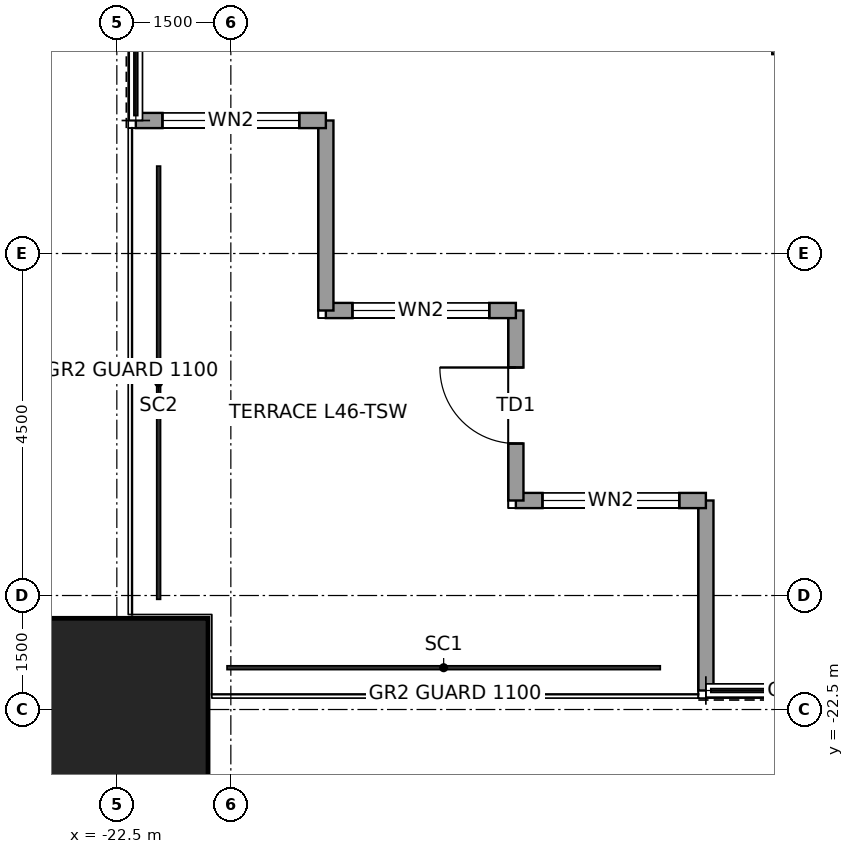
"""IFC4 building model, lengths in metres.
Left out: names, types, materials, properties, quantities, classifications, styles, units other than length and angle.
Written with IfcOpenShell. Run it as: python <this file> out.ifc"""

import sys

from ifc_helpers import new_model, si_unit, direction, frame, frame_2d, origin, origin_2d, place, context, subcontext, project, spatial, rectangle, hollow_rectangle, extrude, element, fill, save


model = new_model("IFC4")
c1 = context("Model", 3, precision=1e-05, world=origin(), true_north=direction((0.0, 1.0)))
c2 = subcontext(c1, "Body", "Model", "MODEL_VIEW")
j1 = project(units=[si_unit("LENGTHUNIT", "METRE"), si_unit("PLANEANGLEUNIT", "RADIAN")], contexts=[c1])
p1 = place(None, origin())
s1 = spatial("IfcSite", under=j1, at=p1, CompositionType="ELEMENT")
p2 = place(p1, origin())
s2 = spatial("IfcBuilding", under=s1, at=p2, CompositionType="ELEMENT")
p3 = place(p2, frame((0.0, 0.0, 217.9)))
s3 = spatial("IfcBuildingStorey", under=s2, at=p3, CompositionType="ELEMENT", Elevation=217.9)
p4 = place(p3, frame((-22.5, -22.5, 0.0), z_axis=(0.0, 0.0, 1.0), x_axis=(1.0, 0.0, 0.0)))
e1 = element("IfcColumn", 1, at=p4, inside=s3, PredefinedType="COLUMN", context=c2, shape_type="SweptSolid", body=[
    extrude(hollow_rectangle(XDim=2.4, YDim=2.4, WallThickness=0.12, at=origin_2d()), origin(), (0.0, 0.0, 1.0), 4.0),
])
p5 = place(p3, frame((-14.75, -22.25, 0.0), z_axis=(0.0, 0.0, 1.0), x_axis=(0.0, 1.0, 0.0)))
e2 = element("IfcWall", 2, at=p5, inside=s3, PredefinedType="SOLIDWALL", context=c2, shape_type="SweptSolid", body=[
    extrude(rectangle(XDim=2.5, YDim=0.2, at=frame_2d((1.25, 0.0))), origin(), (0.0, 0.0, 1.0), 3.85),
])
p6 = place(p3, frame((-14.75, -19.75, 0.0), z_axis=(0.0, 0.0, 1.0), x_axis=(-1.0, 0.0, 0.0)))
e3 = element("IfcWall", 3, at=p6, inside=s3, PredefinedType="SOLIDWALL", context=c2, shape_type="SweptSolid", body=[
    extrude(rectangle(XDim=2.5, YDim=0.2, at=frame_2d((1.25, 0.0))), origin(), (0.0, 0.0, 1.0), 3.85),
])
p7 = place(p6, frame((0.35, 0.0, 0.3)))
e4 = element("IfcOpeningElement", 4, at=p7, cuts=e3, PredefinedType="OPENING", context=c2, shape_type="SweptSolid", body=[
    extrude(rectangle(XDim=1.8, YDim=2.4, at=frame_2d((0.9, 1.2))), frame((0.0, 0.11, 0.0), z_axis=(0.0, -1.0, 0.0), x_axis=(1.0, 0.0, 0.0)), (0.0, 0.0, 1.0), 0.22),
])
p8 = place(p3, frame((-17.25, -19.75, 0.0), z_axis=(0.0, 0.0, 1.0), x_axis=(0.0, 1.0, 0.0)))
e5 = element("IfcWall", 5, at=p8, inside=s3, PredefinedType="SOLIDWALL", context=c2, shape_type="SweptSolid", body=[
    extrude(rectangle(XDim=2.5, YDim=0.2, at=frame_2d((1.25, 0.0))), origin(), (0.0, 0.0, 1.0), 3.85),
])
p9 = place(p8, frame((0.75, 0.0, 0.0)))
e6 = element("IfcOpeningElement", 6, at=p9, cuts=e5, PredefinedType="OPENING", context=c2, shape_type="SweptSolid", body=[
    extrude(rectangle(XDim=1.0, YDim=2.4, at=frame_2d((0.5, 1.2))), frame((0.0, 0.11, 0.0), z_axis=(0.0, -1.0, 0.0), x_axis=(1.0, 0.0, 0.0)), (0.0, 0.0, 1.0), 0.22),
])
p10 = place(p3, frame((-17.25, -17.25, 0.0), z_axis=(0.0, 0.0, 1.0), x_axis=(-1.0, 0.0, 0.0)))
e7 = element("IfcWall", 7, at=p10, inside=s3, PredefinedType="SOLIDWALL", context=c2, shape_type="SweptSolid", body=[
    extrude(rectangle(XDim=2.5, YDim=0.2, at=frame_2d((1.25, 0.0))), origin(), (0.0, 0.0, 1.0), 3.85),
])
p11 = place(p10, frame((0.35, 0.0, 0.3)))
e8 = element("IfcOpeningElement", 8, at=p11, cuts=e7, PredefinedType="OPENING", context=c2, shape_type="SweptSolid", body=[
    extrude(rectangle(XDim=1.8, YDim=2.4, at=frame_2d((0.9, 1.2))), frame((0.0, 0.11, 0.0), z_axis=(0.0, -1.0, 0.0), x_axis=(1.0, 0.0, 0.0)), (0.0, 0.0, 1.0), 0.22),
])
p12 = place(p3, frame((-19.75, -17.25, 0.0), z_axis=(0.0, 0.0, 1.0), x_axis=(0.0, 1.0, 0.0)))
e9 = element("IfcWall", 9, at=p12, inside=s3, PredefinedType="SOLIDWALL", context=c2, shape_type="SweptSolid", body=[
    extrude(rectangle(XDim=2.5, YDim=0.2, at=frame_2d((1.25, 0.0))), origin(), (0.0, 0.0, 1.0), 3.85),
])
p13 = place(p3, frame((-19.75, -14.75, 0.0), z_axis=(0.0, 0.0, 1.0), x_axis=(-1.0, 0.0, 0.0)))
e10 = element("IfcWall", 10, at=p13, inside=s3, PredefinedType="SOLIDWALL", context=c2, shape_type="SweptSolid", body=[
    extrude(rectangle(XDim=2.5, YDim=0.2, at=frame_2d((1.25, 0.0))), origin(), (0.0, 0.0, 1.0), 3.85),
])
p14 = place(p13, frame((0.35, 0.0, 0.3)))
e11 = element("IfcOpeningElement", 11, at=p14, cuts=e10, PredefinedType="OPENING", context=c2, shape_type="SweptSolid", body=[
    extrude(rectangle(XDim=1.8, YDim=2.4, at=frame_2d((0.9, 1.2))), frame((0.0, 0.11, 0.0), z_axis=(0.0, -1.0, 0.0), x_axis=(1.0, 0.0, 0.0)), (0.0, 0.0, 1.0), 0.22),
])
p15 = place(p3, frame((-13.875, -13.8, 0.0), z_axis=(0.0, 0.0, 1.0), x_axis=(1.0, 0.0, 0.0)))
e12 = element("IfcWall", 12, at=p15, inside=s3, PredefinedType="PARTITIONING", context=c2, shape_type="SweptSolid", body=[
    extrude(rectangle(XDim=8.95, YDim=0.15, at=frame_2d((4.475, 0.0))), origin(), (0.0, 0.0, 1.0), 3.85),
])
p16 = place(p15, frame((3.975, 0.0, 0.0)))
e13 = element("IfcOpeningElement", 13, at=p16, cuts=e12, PredefinedType="OPENING", context=c2, shape_type="SweptSolid", body=[
    extrude(rectangle(XDim=1.0, YDim=2.4, at=frame_2d((0.5, 1.2))), frame((0.0, 0.085, 0.0), z_axis=(0.0, -1.0, 0.0), x_axis=(1.0, 0.0, 0.0)), (0.0, 0.0, 1.0), 0.17),
])
p17 = place(p3, frame((-13.8, -13.875, 0.0), z_axis=(0.0, 0.0, 1.0), x_axis=(0.0, 1.0, 0.0)))
e14 = element("IfcWall", 14, at=p17, inside=s3, PredefinedType="PARTITIONING", context=c2, shape_type="SweptSolid", body=[
    extrude(rectangle(XDim=25.95, YDim=0.15, at=frame_2d((12.975, 0.0))), origin(), (0.0, 0.0, 1.0), 3.85),
])
p18 = place(p7, origin())
e15 = element("IfcWindow", 15, at=p18, inside=s3, PartitioningType="SINGLE_PANEL", PredefinedType="WINDOW", context=c2, shape_type="SweptSolid", body=[
    extrude(rectangle(XDim=1.8, YDim=2.4, at=frame_2d((0.9, 1.2))), frame((0.0, 0.03, 0.0), z_axis=(0.0, -1.0, 0.0), x_axis=(1.0, 0.0, 0.0)), (0.0, 0.0, 1.0), 0.06),
])
fill(e4, e15)
p19 = place(p9, origin())
e16 = element("IfcDoor", 16, at=p19, inside=s3, OperationType="SINGLE_SWING_RIGHT", PredefinedType="DOOR", context=c2, shape_type="SweptSolid", body=[
    extrude(rectangle(XDim=1.0, YDim=2.4, at=frame_2d((0.5, 1.2))), frame((0.0, 0.025, 0.0), z_axis=(0.0, -1.0, 0.0), x_axis=(1.0, 0.0, 0.0)), (0.0, 0.0, 1.0), 0.05),
])
fill(e6, e16)
p20 = place(p11, origin())
e17 = element("IfcWindow", 17, at=p20, inside=s3, PartitioningType="SINGLE_PANEL", PredefinedType="WINDOW", context=c2, shape_type="SweptSolid", body=[
    extrude(rectangle(XDim=1.8, YDim=2.4, at=frame_2d((0.9, 1.2))), frame((0.0, 0.03, 0.0), z_axis=(0.0, -1.0, 0.0), x_axis=(1.0, 0.0, 0.0)), (0.0, 0.0, 1.0), 0.06),
])
fill(e8, e17)
p21 = place(p14, origin())
e18 = element("IfcWindow", 18, at=p21, inside=s3, PartitioningType="SINGLE_PANEL", PredefinedType="WINDOW", context=c2, shape_type="SweptSolid", body=[
    extrude(rectangle(XDim=1.8, YDim=2.4, at=frame_2d((0.9, 1.2))), frame((0.0, 0.03, 0.0), z_axis=(0.0, -1.0, 0.0), x_axis=(1.0, 0.0, 0.0)), (0.0, 0.0, 1.0), 0.06),
])
fill(e11, e18)
save(model, sys.argv[1])
